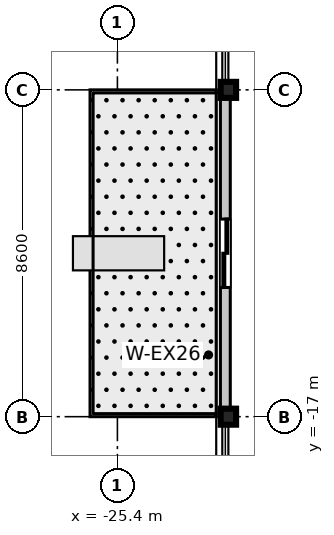
"""IFC4 building model, lengths in metres.
Left out: names, types, materials, properties, quantities, classifications, styles, units other than length and angle.
Written with IfcOpenShell. Run it as: python <this file> out.ifc"""

import sys

from ifc_helpers import new_model, si_unit, direction, frame, frame_2d, origin, origin_2d, place, context, subcontext, project, spatial, rectangle, i_section, extrude, source, transform, mapped, element, fill, save


model = new_model("IFC4")
c1 = context("Model", 3, precision=1e-05, world=origin(), true_north=direction((0.0, 1.0)))
c2 = subcontext(c1, "Body", "Model", "MODEL_VIEW")
j1 = project(units=[si_unit("LENGTHUNIT", "METRE"), si_unit("PLANEANGLEUNIT", "RADIAN")], contexts=[c1])
p1 = place(None, origin())
s1 = spatial("IfcSite", under=j1, at=p1, CompositionType="ELEMENT")
p2 = place(p1, origin())
s2 = spatial("IfcBuilding", under=s1, at=p2, CompositionType="ELEMENT")
p3 = place(p2, frame((0.0, 0.0, 156.3)))
s3 = spatial("IfcBuildingStorey", under=s2, at=p3, CompositionType="ELEMENT", Elevation=156.3)
m1 = source(origin(), c2, "Body", "SweptSolid", [
    extrude(i_section(OverallWidth=0.406, OverallDepth=0.422, WebThickness=0.019, FlangeThickness=0.03, at=origin_2d()), origin(), (0.0, 0.0, 1.0), 3.605),
])
for number, where, z_axis, x_axis in (
    (1, (-22.48, -17.0, 0.0), (0.0, 0.0, 1.0), (1.0, 0.0, 0.0)),
    (2, (-22.48, -8.4, 0.0), (0.0, 0.0, 1.0), (1.0, 0.0, 0.0)),
):
    element("IfcColumn", number, at=place(p3, frame(where, z_axis=z_axis, x_axis=x_axis)), inside=s3, PredefinedType="COLUMN", context=c2, shape_type="MappedRepresentation", body=[
        mapped(m1, transform((0.0, 0.0, 0.0), scale=1.0)),
    ])
m2 = source(origin(), c2, "Body", "SweptSolid", [
    extrude(rectangle(XDim=8.6, YDim=0.26, at=frame_2d((4.3, 0.0))), origin(), (0.0, 0.0, 1.0), 2.87),
])
p4 = place(p3, frame((-22.56, -17.0, 0.0), z_axis=(0.0, 0.0, 1.0), x_axis=(0.0, 1.0, 0.0)))
e3 = element("IfcWall", 3, at=p4, inside=s3, PredefinedType="STANDARD", context=c2, shape_type="MappedRepresentation", body=[
    mapped(m2, transform((0.0, 0.0, 0.0), scale=1.0)),
])
p5 = place(p4, frame((3.4, 0.0, 0.0)))
e4 = element("IfcOpeningElement", 4, at=p5, cuts=e3, PredefinedType="OPENING", context=c2, shape_type="SweptSolid", body=[
    extrude(rectangle(XDim=1.8, YDim=2.25, at=frame_2d((0.9, 1.125))), frame((0.0, 0.14, 0.0), z_axis=(0.0, -1.0, 0.0), x_axis=(1.0, 0.0, 0.0)), (0.0, 0.0, 1.0), 0.28),
])
m3 = source(origin(), c2, "Body", "SweptSolid", [
    extrude(rectangle(XDim=1.8, YDim=2.25, at=frame_2d((0.9, 1.125))), frame((0.0, 0.025, 0.0), z_axis=(0.0, -1.0, 0.0), x_axis=(1.0, 0.0, 0.0)), (0.0, 0.0, 1.0), 0.05),
])
p6 = place(p5, origin())
e5 = element("IfcDoor", 5, at=p6, inside=s3, OperationType="DOUBLE_DOOR_SLIDING", PredefinedType="DOOR", context=c2, shape_type="MappedRepresentation", body=[
    mapped(m3, transform((0.0, 0.0, 0.0), scale=1.0)),
])
fill(e4, e5)
save(model, sys.argv[1])
